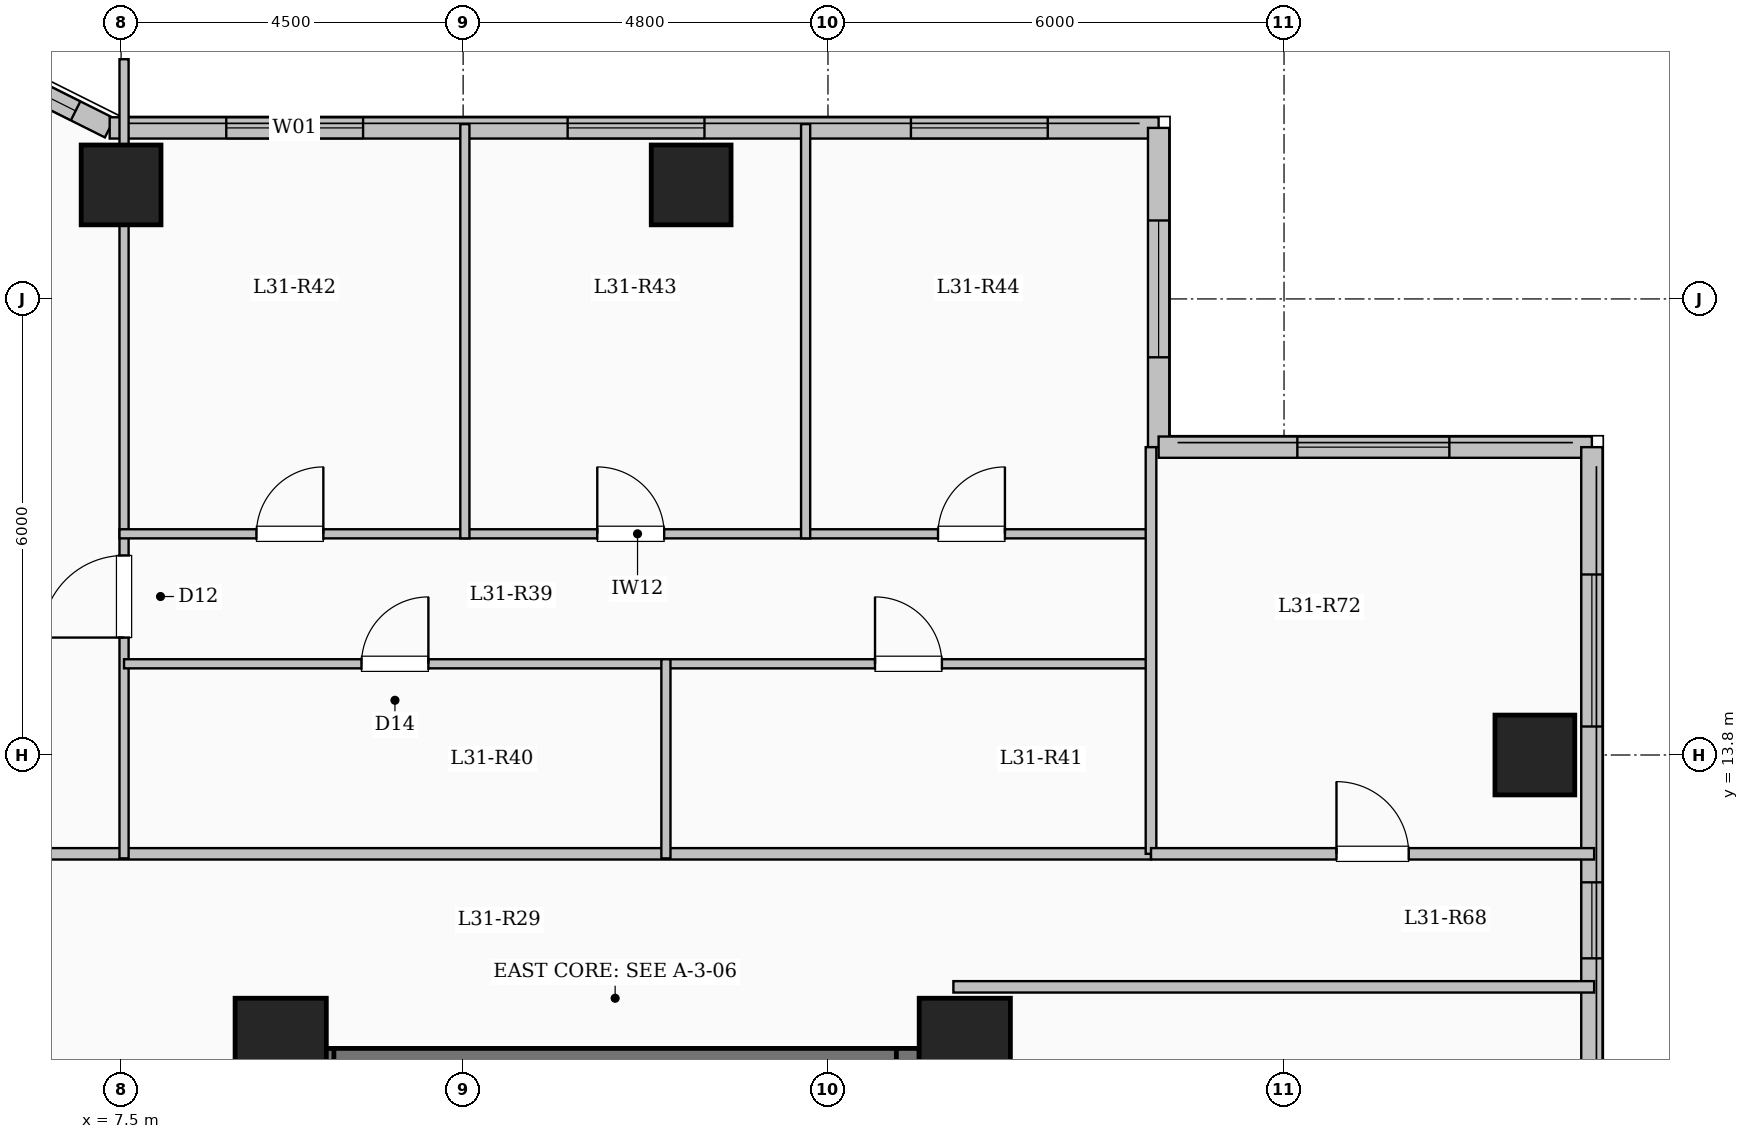
"""IFC4 building model, lengths in metres.
Left out: names, types, materials, properties, quantities, classifications, styles, units other than length and angle.
Written with IfcOpenShell. Run it as: python <this file> out.ifc"""

import sys

from ifc_helpers import new_model, si_unit, direction, frame, frame_2d, origin, origin_2d, place, context, subcontext, project, spatial, rectangle, extrude, element, fill, save


model = new_model("IFC4")
c1 = context("Model", 3, precision=1e-05, world=origin(), true_north=direction((0.0, 1.0)))
c2 = subcontext(c1, "Body", "Model", "MODEL_VIEW")
j1 = project(units=[si_unit("LENGTHUNIT", "METRE"), si_unit("PLANEANGLEUNIT", "RADIAN")], contexts=[c1])
p1 = place(None, origin())
s1 = spatial("IfcSite", under=j1, at=p1, CompositionType="ELEMENT")
p2 = place(p1, origin())
s2 = spatial("IfcBuilding", under=s1, at=p2, CompositionType="ELEMENT")
p3 = place(p2, frame((0.0, 0.0, 115.15)))
s3 = spatial("IfcBuildingStorey", under=s2, at=p3, CompositionType="ELEMENT", Elevation=115.15)
for number, where, z_axis, x_axis in (
    (1, (9.6, 10.0, 0.0), (0.0, 0.0, 1.0), (1.0, 0.0, 0.0)),
    (2, (18.6, 10.0, 0.0), (0.0, 0.0, 1.0), (1.0, 0.0, 0.0)),
):
    element("IfcColumn", number, at=place(p3, frame(where, z_axis=z_axis, x_axis=x_axis)), inside=s3, PredefinedType="COLUMN", context=c2, shape_type="SweptSolid", body=[
        extrude(rectangle(XDim=1.2, YDim=1.2, at=origin_2d()), origin(), (0.0, 0.0, 1.0), 3.35),
    ])
for number, where, z_axis, x_axis in (
    (3, (7.5, 21.3, 0.0), (0.0, 0.0, 1.0), (1.0, 0.0, 0.0)),
    (4, (15.0, 21.3, 0.0), (0.0, 0.0, 1.0), (1.0, 0.0, 0.0)),
    (5, (26.1, 13.8, 0.0), (0.0, 0.0, 1.0), (1.0, 0.0, 0.0)),
):
    element("IfcColumn", number, at=place(p3, frame(where, z_axis=z_axis, x_axis=x_axis)), inside=s3, PredefinedType="COLUMN", context=c2, shape_type="SweptSolid", body=[
        extrude(rectangle(XDim=1.05, YDim=1.05, at=origin_2d()), origin(), (0.0, 0.0, 1.0), 3.35),
    ])
p4 = place(p3, frame((4.35, 23.55, 0.0), z_axis=(0.0, 0.0, 1.0), x_axis=(0.894427191, -0.4472135955, 0.0)))
e6 = element("IfcWall", 6, at=p4, inside=s3, PredefinedType="SOLIDWALL", context=c2, shape_type="SweptSolid", body=[
    extrude(rectangle(XDim=3.354, YDim=0.28, at=frame_2d((1.677, 0.0))), origin(), (0.0, 0.0, 1.0), 3.05),
])
p5 = place(p4, frame((1.653, 0.0, 0.95)))
e7 = element("IfcOpeningElement", 7, at=p5, cuts=e6, PredefinedType="OPENING", context=c2, shape_type="SweptSolid", body=[
    extrude(rectangle(XDim=1.2, YDim=1.5, at=frame_2d((0.6, 0.75))), frame((0.0, 0.15, 0.0), z_axis=(0.0, -1.0, 0.0), x_axis=(1.0, 0.0, 0.0)), (0.0, 0.0, 1.0), 0.3),
])
p6 = place(p3, frame((7.35, 22.05, 0.0), z_axis=(0.0, 0.0, 1.0), x_axis=(1.0, 0.0, 0.0)))
e8 = element("IfcWall", 8, at=p6, inside=s3, PredefinedType="SOLIDWALL", context=c2, shape_type="SweptSolid", body=[
    extrude(rectangle(XDim=13.8, YDim=0.28, at=frame_2d((6.9, 0.0))), origin(), (0.0, 0.0, 1.0), 3.05),
])
p7 = place(p6, frame((1.534, 0.0, 0.9)))
e9 = element("IfcOpeningElement", 9, at=p7, cuts=e8, PredefinedType="OPENING", context=c2, shape_type="SweptSolid", body=[
    extrude(rectangle(XDim=1.8, YDim=1.65, at=frame_2d((0.9, 0.825))), frame((0.0, 0.15, 0.0), z_axis=(0.0, -1.0, 0.0), x_axis=(1.0, 0.0, 0.0)), (0.0, 0.0, 1.0), 0.3),
])
p8 = place(p6, frame((6.025, 0.0, 0.9)))
e10 = element("IfcOpeningElement", 10, at=p8, cuts=e8, PredefinedType="OPENING", context=c2, shape_type="SweptSolid", body=[
    extrude(rectangle(XDim=1.8, YDim=1.65, at=frame_2d((0.9, 0.825))), frame((0.0, 0.15, 0.0), z_axis=(0.0, -1.0, 0.0), x_axis=(1.0, 0.0, 0.0)), (0.0, 0.0, 1.0), 0.3),
])
p9 = place(p6, frame((10.542, 0.0, 0.9)))
e11 = element("IfcOpeningElement", 11, at=p9, cuts=e8, PredefinedType="OPENING", context=c2, shape_type="SweptSolid", body=[
    extrude(rectangle(XDim=1.8, YDim=1.65, at=frame_2d((0.9, 0.825))), frame((0.0, 0.15, 0.0), z_axis=(0.0, -1.0, 0.0), x_axis=(1.0, 0.0, 0.0)), (0.0, 0.0, 1.0), 0.3),
])
p10 = place(p3, frame((21.15, 22.05, 0.0), z_axis=(0.0, 0.0, 1.0), x_axis=(0.0, -1.0, 0.0)))
e12 = element("IfcWall", 12, at=p10, inside=s3, PredefinedType="SOLIDWALL", context=c2, shape_type="SweptSolid", body=[
    extrude(rectangle(XDim=4.2, YDim=0.28, at=frame_2d((2.1, 0.0))), origin(), (0.0, 0.0, 1.0), 3.05),
])
p11 = place(p10, frame((1.218, 0.0, 0.9)))
e13 = element("IfcOpeningElement", 13, at=p11, cuts=e12, PredefinedType="OPENING", context=c2, shape_type="SweptSolid", body=[
    extrude(rectangle(XDim=1.8, YDim=1.65, at=frame_2d((0.9, 0.825))), frame((0.0, 0.15, 0.0), z_axis=(0.0, -1.0, 0.0), x_axis=(1.0, 0.0, 0.0)), (0.0, 0.0, 1.0), 0.3),
])
p12 = place(p3, frame((21.15, 17.85, 0.0), z_axis=(0.0, 0.0, 1.0), x_axis=(1.0, 0.0, 0.0)))
e14 = element("IfcWall", 14, at=p12, inside=s3, PredefinedType="SOLIDWALL", context=c2, shape_type="SweptSolid", body=[
    extrude(rectangle(XDim=5.7, YDim=0.28, at=frame_2d((2.85, 0.0))), origin(), (0.0, 0.0, 1.0), 3.05),
])
p13 = place(p12, frame((1.825, 0.0, 0.9)))
e15 = element("IfcOpeningElement", 15, at=p13, cuts=e14, PredefinedType="OPENING", context=c2, shape_type="SweptSolid", body=[
    extrude(rectangle(XDim=2.0, YDim=1.7, at=frame_2d((1.0, 0.85))), frame((0.0, 0.15, 0.0), z_axis=(0.0, -1.0, 0.0), x_axis=(1.0, 0.0, 0.0)), (0.0, 0.0, 1.0), 0.3),
])
p14 = place(p3, frame((26.85, 17.85, 0.0), z_axis=(0.0, 0.0, 1.0), x_axis=(0.0, -1.0, 0.0)))
e16 = element("IfcWall", 16, at=p14, inside=s3, PredefinedType="SOLIDWALL", context=c2, shape_type="SweptSolid", body=[
    extrude(rectangle(XDim=35.7, YDim=0.28, at=frame_2d((17.85, 0.0))), origin(), (0.0, 0.0, 1.0), 3.05),
])
p15 = place(p14, frame((1.675, 0.0, 0.9)))
e17 = element("IfcOpeningElement", 17, at=p15, cuts=e16, PredefinedType="OPENING", context=c2, shape_type="SweptSolid", body=[
    extrude(rectangle(XDim=2.0, YDim=1.7, at=frame_2d((1.0, 0.85))), frame((0.0, 0.15, 0.0), z_axis=(0.0, -1.0, 0.0), x_axis=(1.0, 0.0, 0.0)), (0.0, 0.0, 1.0), 0.3),
])
p16 = place(p14, frame((5.725, 0.0, 0.95)))
e18 = element("IfcOpeningElement", 18, at=p16, cuts=e16, PredefinedType="OPENING", context=c2, shape_type="SweptSolid", body=[
    extrude(rectangle(XDim=1.0, YDim=1.5, at=frame_2d((0.5, 0.75))), frame((0.0, 0.15, 0.0), z_axis=(0.0, -1.0, 0.0), x_axis=(1.0, 0.0, 0.0)), (0.0, 0.0, 1.0), 0.3),
])
p17 = place(p14, frame((15.1, 0.0, 0.9)))
e19 = element("IfcOpeningElement", 19, at=p17, cuts=e16, PredefinedType="OPENING", context=c2, shape_type="SweptSolid", body=[
    extrude(rectangle(XDim=2.0, YDim=1.7, at=frame_2d((1.0, 0.85))), frame((0.0, 0.15, 0.0), z_axis=(0.0, -1.0, 0.0), x_axis=(1.0, 0.0, 0.0)), (0.0, 0.0, 1.0), 0.3),
])
p18 = place(p14, frame((25.857, 0.0, 0.9)))
e20 = element("IfcOpeningElement", 20, at=p18, cuts=e16, PredefinedType="OPENING", context=c2, shape_type="SweptSolid", body=[
    extrude(rectangle(XDim=1.5, YDim=1.65, at=frame_2d((0.75, 0.825))), frame((0.0, 0.15, 0.0), z_axis=(0.0, -1.0, 0.0), x_axis=(1.0, 0.0, 0.0)), (0.0, 0.0, 1.0), 0.3),
])
p19 = place(p14, frame((30.75, 0.0, 0.9)))
e21 = element("IfcOpeningElement", 21, at=p19, cuts=e16, PredefinedType="OPENING", context=c2, shape_type="SweptSolid", body=[
    extrude(rectangle(XDim=2.4, YDim=1.8, at=frame_2d((1.2, 0.9))), frame((0.0, 0.15, 0.0), z_axis=(0.0, -1.0, 0.0), x_axis=(1.0, 0.0, 0.0)), (0.0, 0.0, 1.0), 0.3),
])
p20 = place(p3, frame((10.0, 9.79, 0.0), z_axis=(0.0, 0.0, 1.0), x_axis=(1.0, 0.0, 0.0)))
e22 = element("IfcWall", 22, at=p20, inside=s3, PredefinedType="SHEAR", context=c2, shape_type="SweptSolid", body=[
    extrude(rectangle(XDim=8.0, YDim=0.3, at=frame_2d((4.0, 0.0))), origin(), (0.0, 0.0, 1.0), 3.35),
])
for number, where, z_axis, x_axis in (
    (23, (10.15, 6.35, 0.0), (0.0, 0.0, 1.0), (0.0, 1.0, 0.0)),
    (24, (17.85, 6.35, 0.0), (0.0, 0.0, 1.0), (0.0, 1.0, 0.0)),
):
    element("IfcWall", number, at=place(p3, frame(where, z_axis=z_axis, x_axis=x_axis)), inside=s3, PredefinedType="SHEAR", context=c2, shape_type="SweptSolid", body=[
        extrude(rectangle(XDim=3.59, YDim=0.3, at=frame_2d((1.795, 0.0))), origin(), (0.0, 0.0, 1.0), 3.35),
    ])
p21 = place(p3, frame((3.85, 12.5, 0.0), z_axis=(0.0, 0.0, 1.0), x_axis=(1.0, 0.0, 0.0)))
e25 = element("IfcWall", 25, at=p21, inside=s3, PredefinedType="PARTITIONING", context=c2, shape_type="SweptSolid", body=[
    extrude(rectangle(XDim=17.2, YDim=0.15, at=frame_2d((8.6, 0.0))), origin(), (0.0, 0.0, 1.0), 3.05),
])
p22 = place(p21, frame((0.7, 0.0, 0.0)))
e26 = element("IfcOpeningElement", 26, at=p22, cuts=e25, PredefinedType="OPENING", context=c2, shape_type="SweptSolid", body=[
    extrude(rectangle(XDim=0.96, YDim=2.15, at=frame_2d((0.48, 1.075))), frame((0.0, 0.085, 0.0), z_axis=(0.0, -1.0, 0.0), x_axis=(1.0, 0.0, 0.0)), (0.0, 0.0, 1.0), 0.17),
])
p23 = place(p3, frame((7.539, 12.44, 0.0), z_axis=(0.0, 0.0, 1.0), x_axis=(0.0, 1.0, 0.0)))
e27 = element("IfcWall", 27, at=p23, inside=s3, PredefinedType="PARTITIONING", context=c2, shape_type="SweptSolid", body=[
    extrude(rectangle(XDim=10.514, YDim=0.12, at=frame_2d((5.257, 0.0))), origin(), (0.0, 0.0, 1.0), 2.385),
])
p24 = place(p23, frame((2.905, 0.0, 0.0)))
e28 = element("IfcOpeningElement", 28, at=p24, cuts=e27, PredefinedType="OPENING", context=c2, shape_type="SweptSolid", body=[
    extrude(rectangle(XDim=1.08, YDim=2.15, at=frame_2d((0.54, 1.075))), frame((0.0, 0.07, 0.0), z_axis=(0.0, -1.0, 0.0), x_axis=(1.0, 0.0, 0.0)), (0.0, 0.0, 1.0), 0.14),
])
p25 = place(p3, frame((7.539, 15.0, 0.0), z_axis=(0.0, 0.0, 1.0), x_axis=(1.0, 0.0, 0.0)))
e29 = element("IfcWall", 29, at=p25, inside=s3, PredefinedType="PARTITIONING", context=c2, shape_type="SweptSolid", body=[
    extrude(rectangle(XDim=7.129, YDim=0.12, at=frame_2d((3.564, 0.0))), origin(), (0.0, 0.0, 1.0), 3.05),
])
p26 = place(p25, frame((3.124, 0.0, 0.0)))
e30 = element("IfcOpeningElement", 30, at=p26, cuts=e29, PredefinedType="OPENING", context=c2, shape_type="SweptSolid", body=[
    extrude(rectangle(XDim=0.88, YDim=2.1, at=frame_2d((0.44, 1.05))), frame((0.0, 0.07, 0.0), z_axis=(0.0, -1.0, 0.0), x_axis=(1.0, 0.0, 0.0)), (0.0, 0.0, 1.0), 0.14),
])
p27 = place(p3, frame((14.668, 15.0, 0.0), z_axis=(0.0, 0.0, 1.0), x_axis=(1.0, 0.0, 0.0)))
e31 = element("IfcWall", 31, at=p27, inside=s3, PredefinedType="PARTITIONING", context=c2, shape_type="SweptSolid", body=[
    extrude(rectangle(XDim=6.382, YDim=0.12, at=frame_2d((3.191, 0.0))), origin(), (0.0, 0.0, 1.0), 3.05),
])
p28 = place(p27, frame((2.751, 0.0, 0.0)))
e32 = element("IfcOpeningElement", 32, at=p28, cuts=e31, PredefinedType="OPENING", context=c2, shape_type="SweptSolid", body=[
    extrude(rectangle(XDim=0.88, YDim=2.1, at=frame_2d((0.44, 1.05))), frame((0.0, 0.07, 0.0), z_axis=(0.0, -1.0, 0.0), x_axis=(1.0, 0.0, 0.0)), (0.0, 0.0, 1.0), 0.14),
])
p29 = place(p3, frame((7.479, 16.71, 0.0), z_axis=(0.0, 0.0, 1.0), x_axis=(1.0, 0.0, 0.0)))
e33 = element("IfcWall", 33, at=p29, inside=s3, PredefinedType="PARTITIONING", context=c2, shape_type="SweptSolid", body=[
    extrude(rectangle(XDim=13.631, YDim=0.12, at=frame_2d((6.815, 0.0))), origin(), (0.0, 0.0, 1.0), 3.05),
])
p30 = place(p29, frame((1.802, 0.0, 0.0)))
e34 = element("IfcOpeningElement", 34, at=p30, cuts=e33, PredefinedType="OPENING", context=c2, shape_type="SweptSolid", body=[
    extrude(rectangle(XDim=0.88, YDim=2.1, at=frame_2d((0.44, 1.05))), frame((0.0, 0.07, 0.0), z_axis=(0.0, -1.0, 0.0), x_axis=(1.0, 0.0, 0.0)), (0.0, 0.0, 1.0), 0.14),
])
p31 = place(p29, frame((6.286, 0.0, 0.0)))
e35 = element("IfcOpeningElement", 35, at=p31, cuts=e33, PredefinedType="OPENING", context=c2, shape_type="SweptSolid", body=[
    extrude(rectangle(XDim=0.88, YDim=2.1, at=frame_2d((0.44, 1.05))), frame((0.0, 0.07, 0.0), z_axis=(0.0, -1.0, 0.0), x_axis=(1.0, 0.0, 0.0)), (0.0, 0.0, 1.0), 0.14),
])
p32 = place(p29, frame((10.769, 0.0, 0.0)))
e36 = element("IfcOpeningElement", 36, at=p32, cuts=e33, PredefinedType="OPENING", context=c2, shape_type="SweptSolid", body=[
    extrude(rectangle(XDim=0.88, YDim=2.1, at=frame_2d((0.44, 1.05))), frame((0.0, 0.07, 0.0), z_axis=(0.0, -1.0, 0.0), x_axis=(1.0, 0.0, 0.0)), (0.0, 0.0, 1.0), 0.14),
])
p33 = place(p3, frame((14.668, 12.44, 0.0), z_axis=(0.0, 0.0, 1.0), x_axis=(0.0, 1.0, 0.0)))
e37 = element("IfcWall", 37, at=p33, inside=s3, PredefinedType="PARTITIONING", context=c2, shape_type="SweptSolid", body=[
    extrude(rectangle(XDim=2.62, YDim=0.12, at=frame_2d((1.31, 0.0))), origin(), (0.0, 0.0, 1.0), 3.05),
])
for number, where, z_axis, x_axis in (
    (38, (12.023, 16.65, 0.0), (0.0, 0.0, 1.0), (0.0, 1.0, 0.0)),
    (39, (16.506, 16.65, 0.0), (0.0, 0.0, 1.0), (0.0, 1.0, 0.0)),
):
    element("IfcWall", number, at=place(p3, frame(where, z_axis=z_axis, x_axis=x_axis)), inside=s3, PredefinedType="PARTITIONING", context=c2, shape_type="SweptSolid", body=[
        extrude(rectangle(XDim=5.45, YDim=0.12, at=frame_2d((2.725, 0.0))), origin(), (0.0, 0.0, 1.0), 3.05),
    ])
p34 = place(p3, frame((18.45, 10.75, 0.0), z_axis=(0.0, 0.0, 1.0), x_axis=(1.0, 0.0, 0.0)))
e40 = element("IfcWall", 40, at=p34, inside=s3, PredefinedType="PARTITIONING", context=c2, shape_type="SweptSolid", body=[
    extrude(rectangle(XDim=8.43, YDim=0.15, at=frame_2d((4.215, 0.0))), origin(), (0.0, 0.0, 1.0), 3.05),
])
p35 = place(p3, frame((21.05, 12.5, 0.0), z_axis=(0.0, 0.0, 1.0), x_axis=(0.0, 1.0, 0.0)))
e41 = element("IfcWall", 41, at=p35, inside=s3, PredefinedType="PARTITIONING", context=c2, shape_type="SweptSolid", body=[
    extrude(rectangle(XDim=5.35, YDim=0.14, at=frame_2d((2.675, 0.0))), origin(), (0.0, 0.0, 1.0), 3.05),
])
p36 = place(p3, frame((21.05, 12.5, 0.0), z_axis=(0.0, 0.0, 1.0), x_axis=(1.0, 0.0, 0.0)))
e42 = element("IfcWall", 42, at=p36, inside=s3, PredefinedType="PARTITIONING", context=c2, shape_type="SweptSolid", body=[
    extrude(rectangle(XDim=5.83, YDim=0.15, at=frame_2d((2.915, 0.0))), origin(), (0.0, 0.0, 1.0), 3.05),
])
p37 = place(p36, frame((2.44, 0.0, 0.0)))
e43 = element("IfcOpeningElement", 43, at=p37, cuts=e42, PredefinedType="OPENING", context=c2, shape_type="SweptSolid", body=[
    extrude(rectangle(XDim=0.95, YDim=2.15, at=frame_2d((0.475, 1.075))), frame((0.0, 0.085, 0.0), z_axis=(0.0, -1.0, 0.0), x_axis=(1.0, 0.0, 0.0)), (0.0, 0.0, 1.0), 0.17),
])
p38 = place(p5, origin())
e44 = element("IfcWindow", 44, at=p38, inside=s3, PartitioningType="SINGLE_PANEL", PredefinedType="WINDOW", context=c2, shape_type="SweptSolid", body=[
    extrude(rectangle(XDim=1.2, YDim=1.5, at=frame_2d((0.6, 0.75))), frame((0.0, 0.03, 0.0), z_axis=(0.0, -1.0, 0.0), x_axis=(1.0, 0.0, 0.0)), (0.0, 0.0, 1.0), 0.06),
])
fill(e7, e44)
p39 = place(p7, origin())
e45 = element("IfcWindow", 45, at=p39, inside=s3, PartitioningType="SINGLE_PANEL", PredefinedType="WINDOW", context=c2, shape_type="SweptSolid", body=[
    extrude(rectangle(XDim=1.8, YDim=1.65, at=frame_2d((0.9, 0.825))), frame((0.0, 0.03, 0.0), z_axis=(0.0, -1.0, 0.0), x_axis=(1.0, 0.0, 0.0)), (0.0, 0.0, 1.0), 0.06),
])
fill(e9, e45)
p40 = place(p8, origin())
e46 = element("IfcWindow", 46, at=p40, inside=s3, PartitioningType="SINGLE_PANEL", PredefinedType="WINDOW", context=c2, shape_type="SweptSolid", body=[
    extrude(rectangle(XDim=1.8, YDim=1.65, at=frame_2d((0.9, 0.825))), frame((0.0, 0.03, 0.0), z_axis=(0.0, -1.0, 0.0), x_axis=(1.0, 0.0, 0.0)), (0.0, 0.0, 1.0), 0.06),
])
fill(e10, e46)
p41 = place(p9, origin())
e47 = element("IfcWindow", 47, at=p41, inside=s3, PartitioningType="SINGLE_PANEL", PredefinedType="WINDOW", context=c2, shape_type="SweptSolid", body=[
    extrude(rectangle(XDim=1.8, YDim=1.65, at=frame_2d((0.9, 0.825))), frame((0.0, 0.03, 0.0), z_axis=(0.0, -1.0, 0.0), x_axis=(1.0, 0.0, 0.0)), (0.0, 0.0, 1.0), 0.06),
])
fill(e11, e47)
p42 = place(p11, origin())
e48 = element("IfcWindow", 48, at=p42, inside=s3, PartitioningType="SINGLE_PANEL", PredefinedType="WINDOW", context=c2, shape_type="SweptSolid", body=[
    extrude(rectangle(XDim=1.8, YDim=1.65, at=frame_2d((0.9, 0.825))), frame((0.0, 0.03, 0.0), z_axis=(0.0, -1.0, 0.0), x_axis=(1.0, 0.0, 0.0)), (0.0, 0.0, 1.0), 0.06),
])
fill(e13, e48)
p43 = place(p13, origin())
e49 = element("IfcWindow", 49, at=p43, inside=s3, PartitioningType="SINGLE_PANEL", PredefinedType="WINDOW", context=c2, shape_type="SweptSolid", body=[
    extrude(rectangle(XDim=2.0, YDim=1.7, at=frame_2d((1.0, 0.85))), frame((0.0, 0.03, 0.0), z_axis=(0.0, -1.0, 0.0), x_axis=(1.0, 0.0, 0.0)), (0.0, 0.0, 1.0), 0.06),
])
fill(e15, e49)
p44 = place(p15, origin())
e50 = element("IfcWindow", 50, at=p44, inside=s3, PartitioningType="SINGLE_PANEL", PredefinedType="WINDOW", context=c2, shape_type="SweptSolid", body=[
    extrude(rectangle(XDim=2.0, YDim=1.7, at=frame_2d((1.0, 0.85))), frame((0.0, 0.03, 0.0), z_axis=(0.0, -1.0, 0.0), x_axis=(1.0, 0.0, 0.0)), (0.0, 0.0, 1.0), 0.06),
])
fill(e17, e50)
p45 = place(p16, origin())
e51 = element("IfcWindow", 51, at=p45, inside=s3, PartitioningType="SINGLE_PANEL", PredefinedType="WINDOW", context=c2, shape_type="SweptSolid", body=[
    extrude(rectangle(XDim=1.0, YDim=1.5, at=frame_2d((0.5, 0.75))), frame((0.0, 0.03, 0.0), z_axis=(0.0, -1.0, 0.0), x_axis=(1.0, 0.0, 0.0)), (0.0, 0.0, 1.0), 0.06),
])
fill(e18, e51)
p46 = place(p24, origin())
e52 = element("IfcDoor", 52, at=p46, inside=s3, OperationType="SINGLE_SWING_LEFT", PredefinedType="DOOR", context=c2, shape_type="SweptSolid", body=[
    extrude(rectangle(XDim=1.08, YDim=2.15, at=frame_2d((0.54, 1.075))), frame((0.0, 0.025, 0.0), z_axis=(0.0, -1.0, 0.0), x_axis=(1.0, 0.0, 0.0)), (0.0, 0.0, 1.0), 0.05),
])
fill(e28, e52)
p47 = place(p26, origin())
e53 = element("IfcDoor", 53, at=p47, inside=s3, OperationType="SINGLE_SWING_RIGHT", PredefinedType="DOOR", context=c2, shape_type="SweptSolid", body=[
    extrude(rectangle(XDim=0.88, YDim=2.1, at=frame_2d((0.44, 1.05))), frame((0.0, 0.025, 0.0), z_axis=(0.0, -1.0, 0.0), x_axis=(1.0, 0.0, 0.0)), (0.0, 0.0, 1.0), 0.05),
])
fill(e30, e53)
p48 = place(p28, origin())
e54 = element("IfcDoor", 54, at=p48, inside=s3, OperationType="SINGLE_SWING_LEFT", PredefinedType="DOOR", context=c2, shape_type="SweptSolid", body=[
    extrude(rectangle(XDim=0.88, YDim=2.1, at=frame_2d((0.44, 1.05))), frame((0.0, 0.025, 0.0), z_axis=(0.0, -1.0, 0.0), x_axis=(1.0, 0.0, 0.0)), (0.0, 0.0, 1.0), 0.05),
])
fill(e32, e54)
p49 = place(p30, origin())
e55 = element("IfcDoor", 55, at=p49, inside=s3, OperationType="SINGLE_SWING_RIGHT", PredefinedType="DOOR", context=c2, shape_type="SweptSolid", body=[
    extrude(rectangle(XDim=0.88, YDim=2.1, at=frame_2d((0.44, 1.05))), frame((0.0, 0.025, 0.0), z_axis=(0.0, -1.0, 0.0), x_axis=(1.0, 0.0, 0.0)), (0.0, 0.0, 1.0), 0.05),
])
fill(e34, e55)
p50 = place(p31, origin())
e56 = element("IfcDoor", 56, at=p50, inside=s3, OperationType="SINGLE_SWING_LEFT", PredefinedType="DOOR", context=c2, shape_type="SweptSolid", body=[
    extrude(rectangle(XDim=0.88, YDim=2.1, at=frame_2d((0.44, 1.05))), frame((0.0, 0.025, 0.0), z_axis=(0.0, -1.0, 0.0), x_axis=(1.0, 0.0, 0.0)), (0.0, 0.0, 1.0), 0.05),
])
fill(e35, e56)
p51 = place(p32, origin())
e57 = element("IfcDoor", 57, at=p51, inside=s3, OperationType="SINGLE_SWING_RIGHT", PredefinedType="DOOR", context=c2, shape_type="SweptSolid", body=[
    extrude(rectangle(XDim=0.88, YDim=2.1, at=frame_2d((0.44, 1.05))), frame((0.0, 0.025, 0.0), z_axis=(0.0, -1.0, 0.0), x_axis=(1.0, 0.0, 0.0)), (0.0, 0.0, 1.0), 0.05),
])
fill(e36, e57)
p52 = place(p37, origin())
e58 = element("IfcDoor", 58, at=p52, inside=s3, OperationType="SINGLE_SWING_LEFT", PredefinedType="DOOR", context=c2, shape_type="SweptSolid", body=[
    extrude(rectangle(XDim=0.95, YDim=2.15, at=frame_2d((0.475, 1.075))), frame((0.0, 0.025, 0.0), z_axis=(0.0, -1.0, 0.0), x_axis=(1.0, 0.0, 0.0)), (0.0, 0.0, 1.0), 0.05),
])
fill(e43, e58)
save(model, sys.argv[1])
